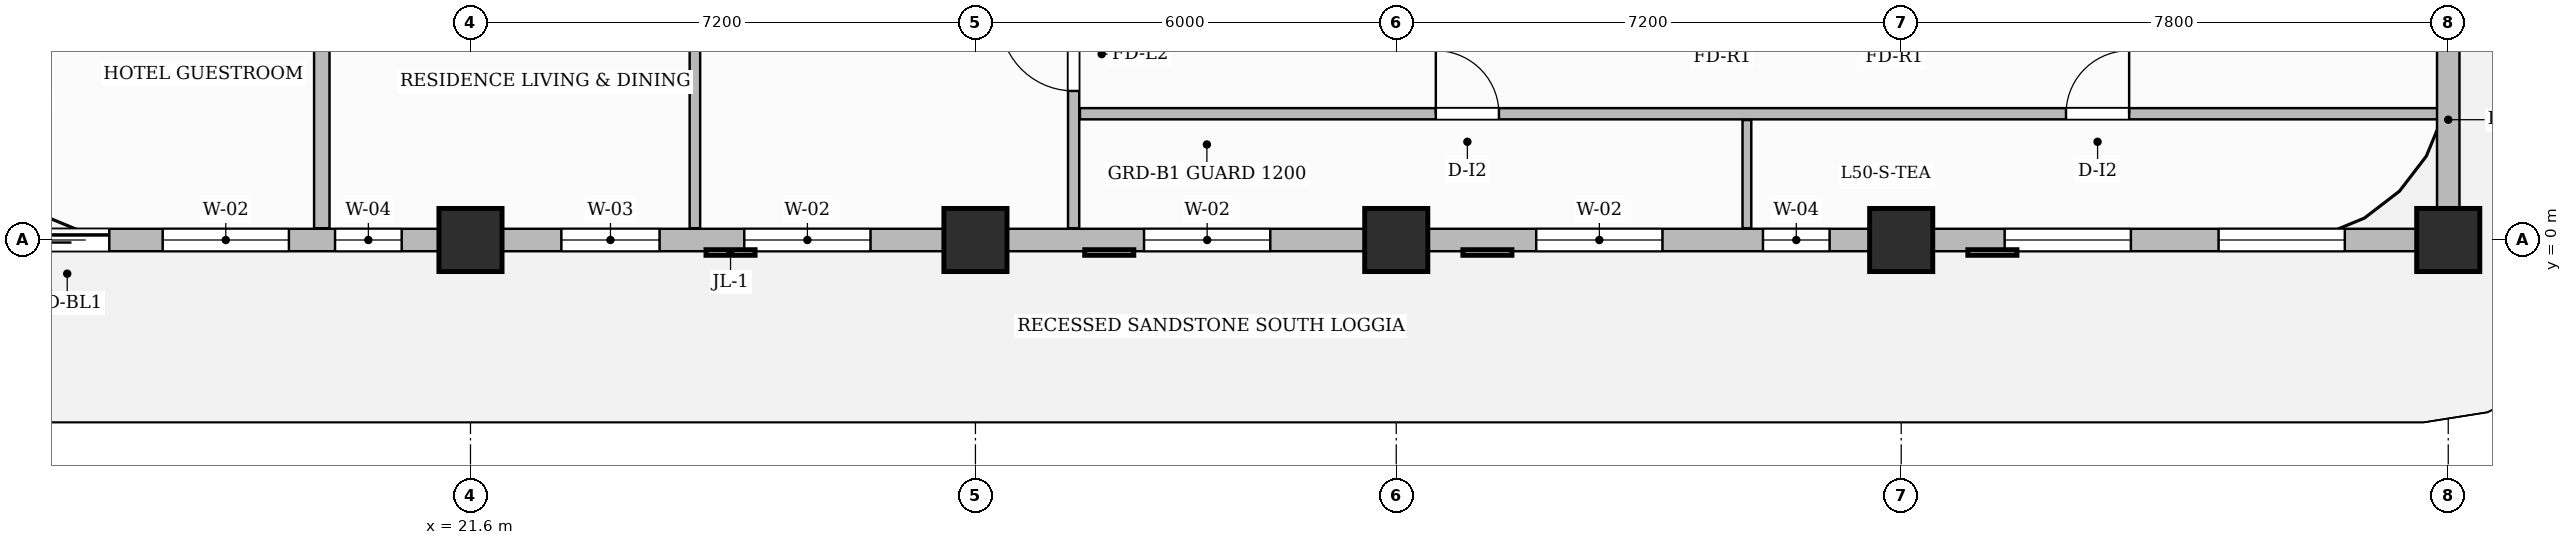
"""IFC4 building model, lengths in metres.
Left out: names, types, materials, properties, quantities, classifications, styles, units other than length and angle.
Written with IfcOpenShell. Run it as: python <this file> out.ifc"""

import sys

from ifc_helpers import new_model, si_unit, direction, frame, frame_2d, origin, origin_2d, place, context, subcontext, project, spatial, rectangle, extrude, source, transform, mapped, element, fill, save


model = new_model("IFC4")
c1 = context("Model", 3, precision=1e-05, world=origin(), true_north=direction((0.0, 1.0)))
c2 = subcontext(c1, "Body", "Model", "MODEL_VIEW")
j1 = project(units=[si_unit("LENGTHUNIT", "METRE"), si_unit("PLANEANGLEUNIT", "RADIAN")], contexts=[c1])
p1 = place(None, origin())
s1 = spatial("IfcSite", under=j1, at=p1, CompositionType="ELEMENT")
p2 = place(p1, origin())
s2 = spatial("IfcBuilding", under=s1, at=p2, CompositionType="ELEMENT")
p3 = place(p2, frame((0.0, 0.0, 201.9)))
s3 = spatial("IfcBuildingStorey", under=s2, at=p3, CompositionType="ELEMENT", Elevation=201.9)
m1 = source(origin(), c2, "Body", "SweptSolid", [
    extrude(rectangle(XDim=0.9, YDim=0.9, at=origin_2d()), origin(), (0.0, 0.0, 1.0), 3.85),
])
for number, where, z_axis, x_axis in (
    (1, (21.6, 0.0, 0.0), (0.0, 0.0, 1.0), (1.0, 0.0, 0.0)),
    (2, (28.8, 0.0, 0.0), (0.0, 0.0, 1.0), (1.0, 0.0, 0.0)),
    (3, (34.8, 0.0, 0.0), (0.0, 0.0, 1.0), (1.0, 0.0, 0.0)),
    (4, (42.0, 0.0, 0.0), (0.0, 0.0, 1.0), (1.0, 0.0, 0.0)),
    (5, (49.8, 0.0, 0.0), (0.0, 0.0, 1.0), (1.0, 0.0, 0.0)),
):
    element("IfcColumn", number, at=place(p3, frame(where, z_axis=z_axis, x_axis=x_axis)), inside=s3, PredefinedType="COLUMN", context=c2, shape_type="MappedRepresentation", body=[
        mapped(m1, transform((0.0, 0.0, 0.0), scale=1.0)),
    ])
p4 = place(p3, frame((30.2, 0.168, 0.0), z_axis=(0.0, 0.0, 1.0), x_axis=(0.0, 1.0, 0.0)))
e6 = element("IfcWall", 6, at=p4, inside=s3, PredefinedType="PARTITIONING", context=c2, shape_type="SweptSolid", body=[
    extrude(rectangle(XDim=9.092, YDim=0.16, at=frame_2d((4.546, 0.0))), origin(), (0.0, 0.0, 1.0), 3.6),
])
p5 = place(p4, frame((1.957, 0.0, 0.0)))
e7 = element("IfcOpeningElement", 7, at=p5, cuts=e6, PredefinedType="OPENING", context=c2, shape_type="SweptSolid", body=[
    extrude(rectangle(XDim=1.05, YDim=2.15, at=frame_2d((0.525, 1.075))), frame((0.0, 0.09, 0.0), z_axis=(0.0, -1.0, 0.0), x_axis=(1.0, 0.0, 0.0)), (0.0, 0.0, 1.0), 0.18),
])
p6 = place(p3, frame((30.29, 1.8, 0.0), z_axis=(0.0, 0.0, 1.0), x_axis=(1.0, 0.0, 0.0)))
e8 = element("IfcWall", 8, at=p6, inside=s3, PredefinedType="PARTITIONING", context=c2, shape_type="SweptSolid", body=[
    extrude(rectangle(XDim=19.37, YDim=0.16, at=frame_2d((9.685, 0.0))), origin(), (0.0, 0.0, 1.0), 3.6),
])
p7 = place(p6, frame((5.074, 0.0, 0.0)))
e9 = element("IfcOpeningElement", 9, at=p7, cuts=e8, PredefinedType="OPENING", context=c2, shape_type="SweptSolid", body=[
    extrude(rectangle(XDim=0.9, YDim=2.15, at=frame_2d((0.45, 1.075))), frame((0.0, 0.09, 0.0), z_axis=(0.0, -1.0, 0.0), x_axis=(1.0, 0.0, 0.0)), (0.0, 0.0, 1.0), 0.18),
])
p8 = place(p6, frame((14.06, 0.0, 0.0)))
e10 = element("IfcOpeningElement", 10, at=p8, cuts=e8, PredefinedType="OPENING", context=c2, shape_type="SweptSolid", body=[
    extrude(rectangle(XDim=0.9, YDim=2.15, at=frame_2d((0.45, 1.075))), frame((0.0, 0.09, 0.0), z_axis=(0.0, -1.0, 0.0), x_axis=(1.0, 0.0, 0.0)), (0.0, 0.0, 1.0), 0.18),
])
p9 = place(p3, frame((39.8, 0.168, 0.0), z_axis=(0.0, 0.0, 1.0), x_axis=(0.0, 1.0, 0.0)))
e11 = element("IfcWall", 11, at=p9, inside=s3, PredefinedType="PARTITIONING", context=c2, shape_type="SweptSolid", body=[
    extrude(rectangle(XDim=1.542, YDim=0.125, at=frame_2d((0.771, 0.0))), origin(), (0.0, 0.0, 1.0), 3.6),
])
p10 = place(p3, frame((19.48, 0.168, 0.0), z_axis=(0.0, 0.0, 1.0), x_axis=(0.0, 1.0, 0.0)))
e12 = element("IfcWall", 12, at=p10, inside=s3, PredefinedType="PARTITIONING", context=c2, shape_type="SweptSolid", body=[
    extrude(rectangle(XDim=9.092, YDim=0.22, at=frame_2d((4.546, 0.0))), origin(), (0.0, 0.0, 1.0), 3.6),
])
p11 = place(p3, frame((24.8, 0.168, 0.0), z_axis=(0.0, 0.0, 1.0), x_axis=(0.0, 1.0, 0.0)))
e13 = element("IfcWall", 13, at=p11, inside=s3, PredefinedType="PARTITIONING", context=c2, shape_type="SweptSolid", body=[
    extrude(rectangle(XDim=9.092, YDim=0.15, at=frame_2d((4.546, 0.0))), origin(), (0.0, 0.0, 1.0), 3.6),
])
p12 = place(p11, frame((7.657, 0.0, 0.0)))
e14 = element("IfcOpeningElement", 14, at=p12, cuts=e13, PredefinedType="OPENING", context=c2, shape_type="SweptSolid", body=[
    extrude(rectangle(XDim=0.9, YDim=2.15, at=frame_2d((0.45, 1.075))), frame((0.0, 0.085, 0.0), z_axis=(0.0, -1.0, 0.0), x_axis=(1.0, 0.0, 0.0)), (0.0, 0.0, 1.0), 0.17),
])
p13 = place(p3, frame((14.4, 0.0, 0.0), z_axis=(0.0, 0.0, 1.0), x_axis=(1.0, 0.0, 0.0)))
e15 = element("IfcWall", 15, at=p13, inside=s3, PredefinedType="SOLIDWALL", context=c2, shape_type="SweptSolid", body=[
    extrude(rectangle(XDim=35.4, YDim=0.32, at=frame_2d((17.7, 0.0))), origin(), (0.0, 0.0, 1.0), 3.085),
])
p14 = place(p13, frame((0.85, 0.0, 0.0)))
e16 = element("IfcOpeningElement", 16, at=p14, cuts=e15, PredefinedType="OPENING", context=c2, shape_type="SweptSolid", body=[
    extrude(rectangle(XDim=1.2, YDim=2.2, at=frame_2d((0.6, 1.1))), frame((0.0, 0.17, 0.0), z_axis=(0.0, -1.0, 0.0), x_axis=(1.0, 0.0, 0.0)), (0.0, 0.0, 1.0), 0.34),
])
p15 = place(p13, frame((2.811, 0.0, 0.8)))
e17 = element("IfcOpeningElement", 17, at=p15, cuts=e15, PredefinedType="OPENING", context=c2, shape_type="SweptSolid", body=[
    extrude(rectangle(XDim=1.8, YDim=1.85, at=frame_2d((0.9, 0.925))), frame((0.0, 0.17, 0.0), z_axis=(0.0, -1.0, 0.0), x_axis=(1.0, 0.0, 0.0)), (0.0, 0.0, 1.0), 0.34),
])
p16 = place(p13, frame((5.269, 0.0, 0.8)))
e18 = element("IfcOpeningElement", 18, at=p16, cuts=e15, PredefinedType="OPENING", context=c2, shape_type="SweptSolid", body=[
    extrude(rectangle(XDim=0.95, YDim=1.75, at=frame_2d((0.475, 0.875))), frame((0.0, 0.17, 0.0), z_axis=(0.0, -1.0, 0.0), x_axis=(1.0, 0.0, 0.0)), (0.0, 0.0, 1.0), 0.34),
])
p17 = place(p13, frame((8.496, 0.0, 0.8)))
e19 = element("IfcOpeningElement", 19, at=p17, cuts=e15, PredefinedType="OPENING", context=c2, shape_type="SweptSolid", body=[
    extrude(rectangle(XDim=1.4, YDim=1.85, at=frame_2d((0.7, 0.925))), frame((0.0, 0.17, 0.0), z_axis=(0.0, -1.0, 0.0), x_axis=(1.0, 0.0, 0.0)), (0.0, 0.0, 1.0), 0.34),
])
p18 = place(p13, frame((11.104, 0.0, 0.8)))
e20 = element("IfcOpeningElement", 20, at=p18, cuts=e15, PredefinedType="OPENING", context=c2, shape_type="SweptSolid", body=[
    extrude(rectangle(XDim=1.8, YDim=1.85, at=frame_2d((0.9, 0.925))), frame((0.0, 0.17, 0.0), z_axis=(0.0, -1.0, 0.0), x_axis=(1.0, 0.0, 0.0)), (0.0, 0.0, 1.0), 0.34),
])
p19 = place(p13, frame((16.804, 0.0, 0.8)))
e21 = element("IfcOpeningElement", 21, at=p19, cuts=e15, PredefinedType="OPENING", context=c2, shape_type="SweptSolid", body=[
    extrude(rectangle(XDim=1.8, YDim=1.85, at=frame_2d((0.9, 0.925))), frame((0.0, 0.17, 0.0), z_axis=(0.0, -1.0, 0.0), x_axis=(1.0, 0.0, 0.0)), (0.0, 0.0, 1.0), 0.34),
])
p20 = place(p13, frame((22.396, 0.0, 0.8)))
e22 = element("IfcOpeningElement", 22, at=p20, cuts=e15, PredefinedType="OPENING", context=c2, shape_type="SweptSolid", body=[
    extrude(rectangle(XDim=1.8, YDim=1.85, at=frame_2d((0.9, 0.925))), frame((0.0, 0.17, 0.0), z_axis=(0.0, -1.0, 0.0), x_axis=(1.0, 0.0, 0.0)), (0.0, 0.0, 1.0), 0.34),
])
p21 = place(p13, frame((25.629, 0.0, 0.8)))
e23 = element("IfcOpeningElement", 23, at=p21, cuts=e15, PredefinedType="OPENING", context=c2, shape_type="SweptSolid", body=[
    extrude(rectangle(XDim=0.95, YDim=1.75, at=frame_2d((0.475, 0.875))), frame((0.0, 0.17, 0.0), z_axis=(0.0, -1.0, 0.0), x_axis=(1.0, 0.0, 0.0)), (0.0, 0.0, 1.0), 0.34),
])
p22 = place(p13, frame((29.075, 0.0, 0.8)))
e24 = element("IfcOpeningElement", 24, at=p22, cuts=e15, PredefinedType="OPENING", context=c2, shape_type="SweptSolid", body=[
    extrude(rectangle(XDim=1.8, YDim=1.85, at=frame_2d((0.9, 0.925))), frame((0.0, 0.17, 0.0), z_axis=(0.0, -1.0, 0.0), x_axis=(1.0, 0.0, 0.0)), (0.0, 0.0, 1.0), 0.34),
])
p23 = place(p13, frame((32.125, 0.0, 0.8)))
e25 = element("IfcOpeningElement", 25, at=p23, cuts=e15, PredefinedType="OPENING", context=c2, shape_type="SweptSolid", body=[
    extrude(rectangle(XDim=1.8, YDim=1.85, at=frame_2d((0.9, 0.925))), frame((0.0, 0.17, 0.0), z_axis=(0.0, -1.0, 0.0), x_axis=(1.0, 0.0, 0.0)), (0.0, 0.0, 1.0), 0.34),
])
p24 = place(p3, frame((49.8, 0.05, 0.0), z_axis=(0.0, 0.0, 1.0), x_axis=(0.0, 1.0, 0.0)))
e26 = element("IfcWall", 26, at=p24, inside=s3, PredefinedType="SOLIDWALL", context=c2, shape_type="SweptSolid", body=[
    extrude(rectangle(XDim=3.33, YDim=0.32, at=frame_2d((1.665, 0.0))), origin(), (0.0, 0.0, 1.0), 3.6),
])
m2 = source(origin(), c2, "Body", "SweptSolid", [
    extrude(rectangle(XDim=1.05, YDim=2.15, at=frame_2d((0.525, 1.075))), frame((0.0, 0.025, 0.0), z_axis=(0.0, -1.0, 0.0), x_axis=(1.0, 0.0, 0.0)), (0.0, 0.0, 1.0), 0.05),
])
p25 = place(p5, origin())
e27 = element("IfcDoor", 27, at=p25, inside=s3, OperationType="SINGLE_SWING_RIGHT", PredefinedType="DOOR", context=c2, shape_type="MappedRepresentation", body=[
    mapped(m2, transform((0.0, 0.0, 0.0), scale=1.0)),
])
fill(e7, e27)
m3 = source(origin(), c2, "Body", "SweptSolid", [
    extrude(rectangle(XDim=0.9, YDim=2.15, at=frame_2d((0.45, 1.075))), frame((0.0, 0.025, 0.0), z_axis=(0.0, -1.0, 0.0), x_axis=(1.0, 0.0, 0.0)), (0.0, 0.0, 1.0), 0.05),
])
p26 = place(p7, origin())
e28 = element("IfcDoor", 28, at=p26, inside=s3, OperationType="SINGLE_SWING_LEFT", PredefinedType="DOOR", context=c2, shape_type="MappedRepresentation", body=[
    mapped(m3, transform((0.0, 0.0, 0.0), scale=1.0)),
])
fill(e9, e28)
p27 = place(p8, origin())
e29 = element("IfcDoor", 29, at=p27, inside=s3, OperationType="SINGLE_SWING_RIGHT", PredefinedType="DOOR", context=c2, shape_type="MappedRepresentation", body=[
    mapped(m3, transform((0.0, 0.0, 0.0), scale=1.0)),
])
fill(e10, e29)
m4 = source(origin(), c2, "Body", "SweptSolid", [
    extrude(rectangle(XDim=1.2, YDim=2.2, at=frame_2d((0.6, 1.1))), frame((0.0, 0.025, 0.0), z_axis=(0.0, -1.0, 0.0), x_axis=(1.0, 0.0, 0.0)), (0.0, 0.0, 1.0), 0.05),
])
p28 = place(p14, origin())
e30 = element("IfcDoor", 30, at=p28, inside=s3, OperationType="SLIDING_TO_LEFT", PredefinedType="DOOR", context=c2, shape_type="MappedRepresentation", body=[
    mapped(m4, transform((0.0, 0.0, 0.0), scale=1.0)),
])
fill(e16, e30)
m5 = source(origin(), c2, "Body", "SweptSolid", [
    extrude(rectangle(XDim=1.8, YDim=1.85, at=frame_2d((0.9, 0.925))), frame((0.0, 0.03, 0.0), z_axis=(0.0, -1.0, 0.0), x_axis=(1.0, 0.0, 0.0)), (0.0, 0.0, 1.0), 0.06),
])
p29 = place(p15, origin())
e31 = element("IfcWindow", 31, at=p29, inside=s3, PartitioningType="DOUBLE_PANEL_VERTICAL", PredefinedType="WINDOW", context=c2, shape_type="MappedRepresentation", body=[
    mapped(m5, transform((0.0, 0.0, 0.0), scale=1.0)),
])
fill(e17, e31)
m6 = source(origin(), c2, "Body", "SweptSolid", [
    extrude(rectangle(XDim=0.95, YDim=1.75, at=frame_2d((0.475, 0.875))), frame((0.0, 0.03, 0.0), z_axis=(0.0, -1.0, 0.0), x_axis=(1.0, 0.0, 0.0)), (0.0, 0.0, 1.0), 0.06),
])
p30 = place(p16, origin())
e32 = element("IfcWindow", 32, at=p30, inside=s3, PartitioningType="SINGLE_PANEL", PredefinedType="WINDOW", context=c2, shape_type="MappedRepresentation", body=[
    mapped(m6, transform((0.0, 0.0, 0.0), scale=1.0)),
])
fill(e18, e32)
m7 = source(origin(), c2, "Body", "SweptSolid", [
    extrude(rectangle(XDim=1.4, YDim=1.85, at=frame_2d((0.7, 0.925))), frame((0.0, 0.03, 0.0), z_axis=(0.0, -1.0, 0.0), x_axis=(1.0, 0.0, 0.0)), (0.0, 0.0, 1.0), 0.06),
])
p31 = place(p17, origin())
e33 = element("IfcWindow", 33, at=p31, inside=s3, PartitioningType="SINGLE_PANEL", PredefinedType="WINDOW", context=c2, shape_type="MappedRepresentation", body=[
    mapped(m7, transform((0.0, 0.0, 0.0), scale=1.0)),
])
fill(e19, e33)
p32 = place(p18, origin())
e34 = element("IfcWindow", 34, at=p32, inside=s3, PartitioningType="DOUBLE_PANEL_VERTICAL", PredefinedType="WINDOW", context=c2, shape_type="MappedRepresentation", body=[
    mapped(m5, transform((0.0, 0.0, 0.0), scale=1.0)),
])
fill(e20, e34)
p33 = place(p19, origin())
e35 = element("IfcWindow", 35, at=p33, inside=s3, PartitioningType="DOUBLE_PANEL_VERTICAL", PredefinedType="WINDOW", context=c2, shape_type="MappedRepresentation", body=[
    mapped(m5, transform((0.0, 0.0, 0.0), scale=1.0)),
])
fill(e21, e35)
p34 = place(p20, origin())
e36 = element("IfcWindow", 36, at=p34, inside=s3, PartitioningType="DOUBLE_PANEL_VERTICAL", PredefinedType="WINDOW", context=c2, shape_type="MappedRepresentation", body=[
    mapped(m5, transform((0.0, 0.0, 0.0), scale=1.0)),
])
fill(e22, e36)
p35 = place(p21, origin())
e37 = element("IfcWindow", 37, at=p35, inside=s3, PartitioningType="SINGLE_PANEL", PredefinedType="WINDOW", context=c2, shape_type="MappedRepresentation", body=[
    mapped(m6, transform((0.0, 0.0, 0.0), scale=1.0)),
])
fill(e23, e37)
p36 = place(p22, origin())
e38 = element("IfcWindow", 38, at=p36, inside=s3, PartitioningType="DOUBLE_PANEL_VERTICAL", PredefinedType="WINDOW", context=c2, shape_type="MappedRepresentation", body=[
    mapped(m5, transform((0.0, 0.0, 0.0), scale=1.0)),
])
fill(e24, e38)
p37 = place(p23, origin())
e39 = element("IfcWindow", 39, at=p37, inside=s3, PartitioningType="DOUBLE_PANEL_VERTICAL", PredefinedType="WINDOW", context=c2, shape_type="MappedRepresentation", body=[
    mapped(m5, transform((0.0, 0.0, 0.0), scale=1.0)),
])
fill(e25, e39)
save(model, sys.argv[1])
